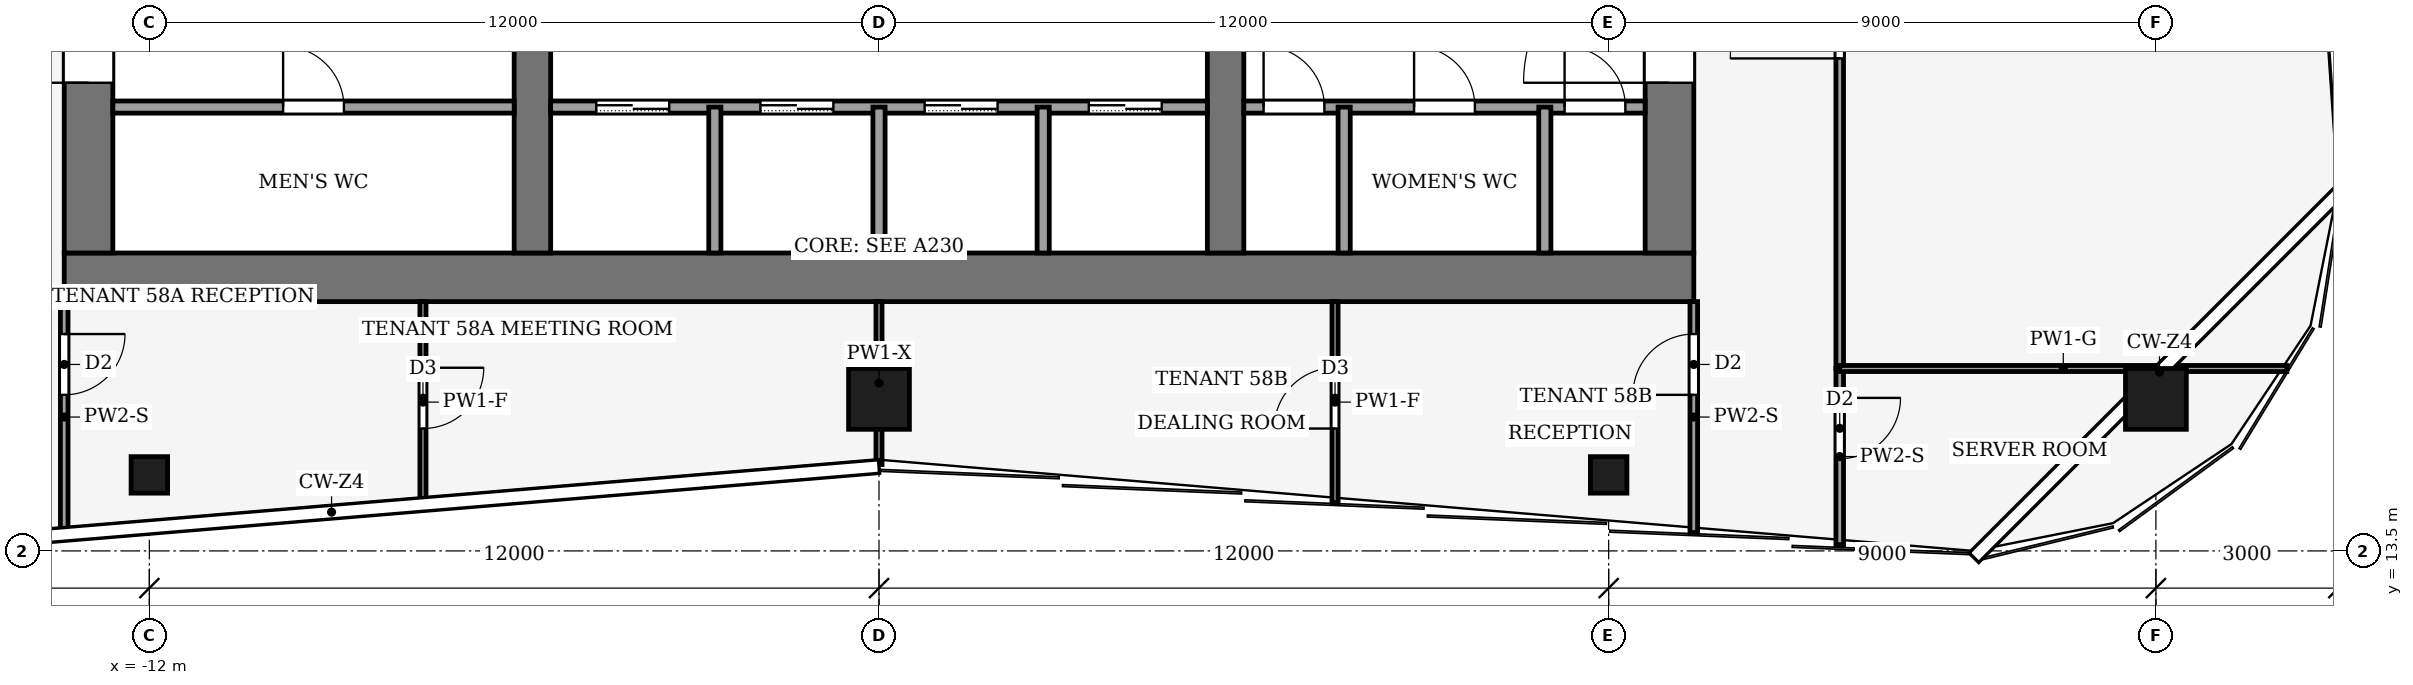
"""IFC4 building model, lengths in metres.
Left out: names, types, materials, properties, quantities, classifications, styles, units other than length and angle.
Written with IfcOpenShell. Run it as: python <this file> out.ifc"""

import sys

from ifc_helpers import new_model, si_unit, direction, frame, frame_2d, origin, origin_2d, place, context, subcontext, project, spatial, rectangle, hollow_rectangle, extrude, element, fill, save


model = new_model("IFC4")
c1 = context("Model", 3, precision=1e-05, world=origin(), true_north=direction((0.0, 1.0)))
c2 = subcontext(c1, "Body", "Model", "MODEL_VIEW")
j1 = project(units=[si_unit("LENGTHUNIT", "METRE"), si_unit("PLANEANGLEUNIT", "RADIAN")], contexts=[c1])
p1 = place(None, origin())
s1 = spatial("IfcSite", under=j1, at=p1, CompositionType="ELEMENT")
p2 = place(p1, origin())
s2 = spatial("IfcBuilding", under=s1, at=p2, CompositionType="ELEMENT")
p3 = place(p2, frame((0.0, 0.0, 254.0)))
s3 = spatial("IfcBuildingStorey", under=s2, at=p3, CompositionType="ELEMENT", Elevation=254.0)
p4 = place(p3, frame((-13.4, 18.0, -0.13), z_axis=(0.0, 0.0, 1.0), x_axis=(1.0, 0.0, 0.0)))
e1 = element("IfcWall", 1, at=p4, inside=s3, PredefinedType="SHEAR", context=c2, shape_type="SweptSolid", body=[
    extrude(rectangle(XDim=26.8, YDim=0.8, at=frame_2d((13.4, 0.0))), origin(), (0.0, 0.0, 1.0), 4.0),
])
p5 = place(p3, frame((-13.0, 18.4, -0.13), z_axis=(0.0, 0.0, 1.0), x_axis=(0.0, 1.0, 0.0)))
e2 = element("IfcWall", 2, at=p5, inside=s3, PredefinedType="SHEAR", context=c2, shape_type="SweptSolid", body=[
    extrude(rectangle(XDim=19.2, YDim=0.8, at=frame_2d((9.6, 0.0))), origin(), (0.0, 0.0, 1.0), 4.0),
])
p6 = place(p5, frame((2.8, 0.0, 0.13)))
e3 = element("IfcOpeningElement", 3, at=p6, cuts=e2, PredefinedType="OPENING", context=c2, shape_type="SweptSolid", body=[
    extrude(rectangle(XDim=2.4, YDim=2.4, at=frame_2d((1.2, 1.2))), frame((0.0, 0.41, 0.0), z_axis=(0.0, -1.0, 0.0), x_axis=(1.0, 0.0, 0.0)), (0.0, 0.0, 1.0), 0.82),
])
p7 = place(p5, frame((13.4, 0.0, 0.13)))
e4 = element("IfcOpeningElement", 4, at=p7, cuts=e2, PredefinedType="OPENING", context=c2, shape_type="SweptSolid", body=[
    extrude(rectangle(XDim=1.4, YDim=2.2, at=frame_2d((0.7, 1.1))), frame((0.0, 0.41, 0.0), z_axis=(0.0, -1.0, 0.0), x_axis=(1.0, 0.0, 0.0)), (0.0, 0.0, 1.0), 0.82),
])
p8 = place(p3, frame((13.0, 18.4, -0.13), z_axis=(0.0, 0.0, 1.0), x_axis=(0.0, 1.0, 0.0)))
e5 = element("IfcWall", 5, at=p8, inside=s3, PredefinedType="SHEAR", context=c2, shape_type="SweptSolid", body=[
    extrude(rectangle(XDim=19.2, YDim=0.8, at=frame_2d((9.6, 0.0))), origin(), (0.0, 0.0, 1.0), 4.0),
])
p9 = place(p8, frame((2.8, 0.0, 0.13)))
e6 = element("IfcOpeningElement", 6, at=p9, cuts=e5, PredefinedType="OPENING", context=c2, shape_type="SweptSolid", body=[
    extrude(rectangle(XDim=2.4, YDim=2.4, at=frame_2d((1.2, 1.2))), frame((0.0, 0.41, 0.0), z_axis=(0.0, -1.0, 0.0), x_axis=(1.0, 0.0, 0.0)), (0.0, 0.0, 1.0), 0.82),
])
p10 = place(p8, frame((13.3, 0.0, 0.13)))
e7 = element("IfcOpeningElement", 7, at=p10, cuts=e5, PredefinedType="OPENING", context=c2, shape_type="SweptSolid", body=[
    extrude(rectangle(XDim=2.4, YDim=2.4, at=frame_2d((1.2, 1.2))), frame((0.0, 0.41, 0.0), z_axis=(0.0, -1.0, 0.0), x_axis=(1.0, 0.0, 0.0)), (0.0, 0.0, 1.0), 0.82),
])
p11 = place(p3, frame((-5.7, 18.4, -0.13), z_axis=(0.0, 0.0, 1.0), x_axis=(0.0, 1.0, 0.0)))
e8 = element("IfcWall", 8, at=p11, inside=s3, PredefinedType="SHEAR", context=c2, shape_type="SweptSolid", body=[
    extrude(rectangle(XDim=19.2, YDim=0.6, at=frame_2d((9.6, 0.0))), origin(), (0.0, 0.0, 1.0), 4.0),
])
p12 = place(p11, frame((8.35, 0.0, 0.13)))
e9 = element("IfcOpeningElement", 9, at=p12, cuts=e8, PredefinedType="OPENING", context=c2, shape_type="SweptSolid", body=[
    extrude(rectangle(XDim=0.9, YDim=2.1, at=frame_2d((0.45, 1.05))), frame((0.0, 0.31, 0.0), z_axis=(0.0, -1.0, 0.0), x_axis=(1.0, 0.0, 0.0)), (0.0, 0.0, 1.0), 0.62),
])
p13 = place(p3, frame((5.7, 18.4, -0.13), z_axis=(0.0, 0.0, 1.0), x_axis=(0.0, 1.0, 0.0)))
e10 = element("IfcWall", 10, at=p13, inside=s3, PredefinedType="SHEAR", context=c2, shape_type="SweptSolid", body=[
    extrude(rectangle(XDim=19.2, YDim=0.6, at=frame_2d((9.6, 0.0))), origin(), (0.0, 0.0, 1.0), 4.0),
])
p14 = place(p13, frame((13.3, 0.0, 0.13)))
e11 = element("IfcOpeningElement", 11, at=p14, cuts=e10, PredefinedType="OPENING", context=c2, shape_type="SweptSolid", body=[
    extrude(rectangle(XDim=2.4, YDim=2.4, at=frame_2d((1.2, 1.2))), frame((0.0, 0.31, 0.0), z_axis=(0.0, -1.0, 0.0), x_axis=(1.0, 0.0, 0.0)), (0.0, 0.0, 1.0), 0.62),
])
for number, where, z_axis, x_axis in (
    (12, (21.0, 16.0, 0.0), (0.0, 0.0, 1.0), (1.0, 0.0, 0.0)),
    (13, (0.0, 16.0, 0.0), (0.0, 0.0, 1.0), (1.0, 0.0, 0.0)),
):
    element("IfcColumn", number, at=place(p3, frame(where, z_axis=z_axis, x_axis=x_axis)), inside=s3, PredefinedType="COLUMN", context=c2, shape_type="SweptSolid", body=[
        extrude(hollow_rectangle(XDim=1.0, YDim=1.0, WallThickness=0.045, at=origin_2d()), origin(), (0.0, 0.0, 1.0), 4.0),
    ])
for number, where, z_axis, x_axis in (
    (14, (-12.0, 14.75, 0.0), (0.0, 0.0, 1.0), (1.0, 0.0, 0.0)),
    (15, (12.0, 14.75, 0.0), (0.0, 0.0, 1.0), (1.0, 0.0, 0.0)),
):
    element("IfcColumn", number, at=place(p3, frame(where, z_axis=z_axis, x_axis=x_axis)), inside=s3, PredefinedType="COLUMN", context=c2, shape_type="SweptSolid", body=[
        extrude(hollow_rectangle(XDim=0.6, YDim=0.6, WallThickness=0.025, at=origin_2d()), origin(), (0.0, 0.0, 1.0), 4.0),
    ])
p15 = place(p3, frame((-12.6, 20.8, 0.0), z_axis=(0.0, 0.0, 1.0), x_axis=(1.0, 0.0, 0.0)))
e16 = element("IfcWall", 16, at=p15, inside=s3, PredefinedType="PARTITIONING", context=c2, shape_type="SweptSolid", body=[
    extrude(rectangle(XDim=6.6, YDim=0.2, at=frame_2d((3.3, 0.0))), origin(), (0.0, 0.0, 1.0), 3.87),
])
p16 = place(p15, frame((2.8, 0.0, 0.0)))
e17 = element("IfcOpeningElement", 17, at=p16, cuts=e16, PredefinedType="OPENING", context=c2, shape_type="SweptSolid", body=[
    extrude(rectangle(XDim=1.0, YDim=2.1, at=frame_2d((0.5, 1.05))), frame((0.0, 0.11, 0.0), z_axis=(0.0, -1.0, 0.0), x_axis=(1.0, 0.0, 0.0)), (0.0, 0.0, 1.0), 0.22),
])
p17 = place(p3, frame((-5.4, 20.8, 0.0), z_axis=(0.0, 0.0, 1.0), x_axis=(1.0, 0.0, 0.0)))
e18 = element("IfcWall", 18, at=p17, inside=s3, PredefinedType="PARTITIONING", context=c2, shape_type="SweptSolid", body=[
    extrude(rectangle(XDim=10.8, YDim=0.2, at=frame_2d((5.4, 0.0))), origin(), (0.0, 0.0, 1.0), 3.87),
])
p18 = place(p17, frame((0.75, 0.0, 0.0)))
e19 = element("IfcOpeningElement", 19, at=p18, cuts=e18, PredefinedType="OPENING", context=c2, shape_type="SweptSolid", body=[
    extrude(rectangle(XDim=1.2, YDim=2.2, at=frame_2d((0.6, 1.1))), frame((0.0, 0.11, 0.0), z_axis=(0.0, -1.0, 0.0), x_axis=(1.0, 0.0, 0.0)), (0.0, 0.0, 1.0), 0.22),
])
p19 = place(p17, frame((3.45, 0.0, 0.0)))
e20 = element("IfcOpeningElement", 20, at=p19, cuts=e18, PredefinedType="OPENING", context=c2, shape_type="SweptSolid", body=[
    extrude(rectangle(XDim=1.2, YDim=2.2, at=frame_2d((0.6, 1.1))), frame((0.0, 0.11, 0.0), z_axis=(0.0, -1.0, 0.0), x_axis=(1.0, 0.0, 0.0)), (0.0, 0.0, 1.0), 0.22),
])
p20 = place(p17, frame((6.15, 0.0, 0.0)))
e21 = element("IfcOpeningElement", 21, at=p20, cuts=e18, PredefinedType="OPENING", context=c2, shape_type="SweptSolid", body=[
    extrude(rectangle(XDim=1.2, YDim=2.2, at=frame_2d((0.6, 1.1))), frame((0.0, 0.11, 0.0), z_axis=(0.0, -1.0, 0.0), x_axis=(1.0, 0.0, 0.0)), (0.0, 0.0, 1.0), 0.22),
])
p21 = place(p17, frame((8.85, 0.0, 0.0)))
e22 = element("IfcOpeningElement", 22, at=p21, cuts=e18, PredefinedType="OPENING", context=c2, shape_type="SweptSolid", body=[
    extrude(rectangle(XDim=1.2, YDim=2.2, at=frame_2d((0.6, 1.1))), frame((0.0, 0.11, 0.0), z_axis=(0.0, -1.0, 0.0), x_axis=(1.0, 0.0, 0.0)), (0.0, 0.0, 1.0), 0.22),
])
p22 = place(p3, frame((6.0, 20.8, 0.0), z_axis=(0.0, 0.0, 1.0), x_axis=(1.0, 0.0, 0.0)))
e23 = element("IfcWall", 23, at=p22, inside=s3, PredefinedType="PARTITIONING", context=c2, shape_type="SweptSolid", body=[
    extrude(rectangle(XDim=6.6, YDim=0.2, at=frame_2d((3.3, 0.0))), origin(), (0.0, 0.0, 1.0), 3.87),
])
p23 = place(p22, frame((0.325, 0.0, 0.0)))
e24 = element("IfcOpeningElement", 24, at=p23, cuts=e23, PredefinedType="OPENING", context=c2, shape_type="SweptSolid", body=[
    extrude(rectangle(XDim=1.0, YDim=2.1, at=frame_2d((0.5, 1.05))), frame((0.0, 0.11, 0.0), z_axis=(0.0, -1.0, 0.0), x_axis=(1.0, 0.0, 0.0)), (0.0, 0.0, 1.0), 0.22),
])
p24 = place(p22, frame((2.8, 0.0, 0.0)))
e25 = element("IfcOpeningElement", 25, at=p24, cuts=e23, PredefinedType="OPENING", context=c2, shape_type="SweptSolid", body=[
    extrude(rectangle(XDim=1.0, YDim=2.1, at=frame_2d((0.5, 1.05))), frame((0.0, 0.11, 0.0), z_axis=(0.0, -1.0, 0.0), x_axis=(1.0, 0.0, 0.0)), (0.0, 0.0, 1.0), 0.22),
])
p25 = place(p22, frame((5.275, 0.0, 0.0)))
e26 = element("IfcOpeningElement", 26, at=p25, cuts=e23, PredefinedType="OPENING", context=c2, shape_type="SweptSolid", body=[
    extrude(rectangle(XDim=1.0, YDim=2.1, at=frame_2d((0.5, 1.05))), frame((0.0, 0.11, 0.0), z_axis=(0.0, -1.0, 0.0), x_axis=(1.0, 0.0, 0.0)), (0.0, 0.0, 1.0), 0.22),
])
for number, where, z_axis, x_axis in (
    (27, (-2.7, 18.4, 0.0), (0.0, 0.0, 1.0), (0.0, 1.0, 0.0)),
    (28, (0.0, 18.4, 0.0), (0.0, 0.0, 1.0), (0.0, 1.0, 0.0)),
    (29, (2.7, 18.4, 0.0), (0.0, 0.0, 1.0), (0.0, 1.0, 0.0)),
    (30, (7.65, 18.4, 0.0), (0.0, 0.0, 1.0), (0.0, 1.0, 0.0)),
    (31, (10.95, 18.4, 0.0), (0.0, 0.0, 1.0), (0.0, 1.0, 0.0)),
):
    element("IfcWall", number, at=place(p3, frame(where, z_axis=z_axis, x_axis=x_axis)), inside=s3, PredefinedType="PARTITIONING", context=c2, shape_type="SweptSolid", body=[
        extrude(rectangle(XDim=2.4, YDim=0.2, at=frame_2d((1.2, 0.0))), origin(), (0.0, 0.0, 1.0), 3.87),
    ])
p26 = place(p3, frame((15.8, 16.5, 0.0), z_axis=(0.0, 0.0, 1.0), x_axis=(0.0, -1.0, 0.0)))
e32 = element("IfcWall", 32, at=p26, inside=s3, PredefinedType="PARTITIONING", context=c2, shape_type="SweptSolid", body=[
    extrude(rectangle(XDim=2.897, YDim=0.125, at=frame_2d((1.448, 0.0))), origin(), (0.0, 0.0, 1.0), 3.04),
])
p27 = place(p26, frame((0.483, 0.0, 0.0)))
e33 = element("IfcOpeningElement", 33, at=p27, cuts=e32, PredefinedType="OPENING", context=c2, shape_type="SweptSolid", body=[
    extrude(rectangle(XDim=1.0, YDim=2.1, at=frame_2d((0.5, 1.05))), frame((0.0, 0.073, 0.0), z_axis=(0.0, -1.0, 0.0), x_axis=(1.0, 0.0, 0.0)), (0.0, 0.0, 1.0), 0.145),
])
p28 = place(p3, frame((15.8, 16.5, 0.0), z_axis=(0.0, 0.0, 1.0), x_axis=(0.0, 1.0, 0.0)))
e34 = element("IfcWall", 34, at=p28, inside=s3, PredefinedType="PARTITIONING", context=c2, shape_type="SweptSolid", body=[
    extrude(rectangle(XDim=12.0, YDim=0.125, at=frame_2d((6.0, 0.0))), origin(), (0.0, 0.0, 1.0), 3.14),
])
p29 = place(p28, frame((5.1, 0.0, 0.0)))
e35 = element("IfcOpeningElement", 35, at=p29, cuts=e34, PredefinedType="OPENING", context=c2, shape_type="SweptSolid", body=[
    extrude(rectangle(XDim=1.8, YDim=2.1, at=frame_2d((0.9, 1.05))), frame((0.0, 0.073, 0.0), z_axis=(0.0, -1.0, 0.0), x_axis=(1.0, 0.0, 0.0)), (0.0, 0.0, 1.0), 0.145),
])
p30 = place(p3, frame((-13.4, 17.6, 0.0), z_axis=(0.0, 0.0, 1.0), x_axis=(0.0, -1.0, 0.0)))
e36 = element("IfcWall", 36, at=p30, inside=s3, PredefinedType="PARTITIONING", context=c2, shape_type="SweptSolid", body=[
    extrude(rectangle(XDim=3.797, YDim=0.125, at=frame_2d((1.898, 0.0))), origin(), (0.0, 0.0, 1.0), 3.04),
])
p31 = place(p30, frame((0.533, 0.0, 0.0)))
e37 = element("IfcOpeningElement", 37, at=p31, cuts=e36, PredefinedType="OPENING", context=c2, shape_type="SweptSolid", body=[
    extrude(rectangle(XDim=1.0, YDim=2.1, at=frame_2d((0.5, 1.05))), frame((0.0, 0.073, 0.0), z_axis=(0.0, -1.0, 0.0), x_axis=(1.0, 0.0, 0.0)), (0.0, 0.0, 1.0), 0.145),
])
p32 = place(p3, frame((13.4, 13.803, 0.0), z_axis=(0.0, 0.0, 1.0), x_axis=(0.0, 1.0, 0.0)))
e38 = element("IfcWall", 38, at=p32, inside=s3, PredefinedType="PARTITIONING", context=c2, shape_type="SweptSolid", body=[
    extrude(rectangle(XDim=3.797, YDim=0.125, at=frame_2d((1.898, 0.0))), origin(), (0.0, 0.0, 1.0), 3.04),
])
p33 = place(p32, frame((2.263, 0.0, 0.0)))
e39 = element("IfcOpeningElement", 39, at=p33, cuts=e38, PredefinedType="OPENING", context=c2, shape_type="SweptSolid", body=[
    extrude(rectangle(XDim=1.0, YDim=2.1, at=frame_2d((0.5, 1.05))), frame((0.0, 0.073, 0.0), z_axis=(0.0, -1.0, 0.0), x_axis=(1.0, 0.0, 0.0)), (0.0, 0.0, 1.0), 0.145),
])
p34 = place(p3, frame((23.153, 16.5, 0.0), z_axis=(0.0, 0.0, 1.0), x_axis=(-1.0, 0.0, 0.0)))
e40 = element("IfcWall", 40, at=p34, inside=s3, PredefinedType="PARTITIONING", context=c2, shape_type="SweptSolid", body=[
    extrude(rectangle(XDim=7.353, YDim=0.1, at=frame_2d((3.676, 0.0))), origin(), (0.0, 0.0, 1.0), 2.93),
])
p35 = place(p3, frame((-7.5, 17.6, 0.0), z_axis=(0.0, 0.0, 1.0), x_axis=(0.0, -1.0, 0.0)))
e41 = element("IfcWall", 41, at=p35, inside=s3, PredefinedType="PARTITIONING", context=c2, shape_type="SweptSolid", body=[
    extrude(rectangle(XDim=3.305, YDim=0.1, at=frame_2d((1.653, 0.0))), origin(), (0.0, 0.0, 1.0), 3.04),
])
p36 = place(p35, frame((1.087, 0.0, 0.0)))
e42 = element("IfcOpeningElement", 42, at=p36, cuts=e41, PredefinedType="OPENING", context=c2, shape_type="SweptSolid", body=[
    extrude(rectangle(XDim=1.0, YDim=2.1, at=frame_2d((0.5, 1.05))), frame((0.0, 0.06, 0.0), z_axis=(0.0, -1.0, 0.0), x_axis=(1.0, 0.0, 0.0)), (0.0, 0.0, 1.0), 0.12),
])
p37 = place(p3, frame((0.0, 14.92, 0.0), z_axis=(0.0, 0.0, 1.0), x_axis=(0.0, 1.0, 0.0)))
e43 = element("IfcWall", 43, at=p37, inside=s3, PredefinedType="PARTITIONING", context=c2, shape_type="SweptSolid", body=[
    extrude(rectangle(XDim=2.68, YDim=0.1, at=frame_2d((1.34, 0.0))), origin(), (0.0, 0.0, 1.0), 3.54),
])
p38 = place(p3, frame((7.5, 14.295, 0.0), z_axis=(0.0, 0.0, 1.0), x_axis=(0.0, 1.0, 0.0)))
e44 = element("IfcWall", 44, at=p38, inside=s3, PredefinedType="PARTITIONING", context=c2, shape_type="SweptSolid", body=[
    extrude(rectangle(XDim=3.305, YDim=0.1, at=frame_2d((1.653, 0.0))), origin(), (0.0, 0.0, 1.0), 3.04),
])
p39 = place(p38, frame((1.218, 0.0, 0.0)))
e45 = element("IfcOpeningElement", 45, at=p39, cuts=e44, PredefinedType="OPENING", context=c2, shape_type="SweptSolid", body=[
    extrude(rectangle(XDim=1.0, YDim=2.1, at=frame_2d((0.5, 1.05))), frame((0.0, 0.06, 0.0), z_axis=(0.0, -1.0, 0.0), x_axis=(1.0, 0.0, 0.0)), (0.0, 0.0, 1.0), 0.12),
])
p40 = place(p18, origin())
e46 = element("IfcDoor", 46, at=p40, inside=s3, OperationType="SLIDING_TO_LEFT", PredefinedType="DOOR", context=c2, shape_type="SweptSolid", body=[
    extrude(rectangle(XDim=1.2, YDim=2.2, at=frame_2d((0.6, 1.1))), frame((0.0, 0.025, 0.0), z_axis=(0.0, -1.0, 0.0), x_axis=(1.0, 0.0, 0.0)), (0.0, 0.0, 1.0), 0.05),
])
fill(e19, e46)
p41 = place(p19, origin())
e47 = element("IfcDoor", 47, at=p41, inside=s3, OperationType="SLIDING_TO_LEFT", PredefinedType="DOOR", context=c2, shape_type="SweptSolid", body=[
    extrude(rectangle(XDim=1.2, YDim=2.2, at=frame_2d((0.6, 1.1))), frame((0.0, 0.025, 0.0), z_axis=(0.0, -1.0, 0.0), x_axis=(1.0, 0.0, 0.0)), (0.0, 0.0, 1.0), 0.05),
])
fill(e20, e47)
p42 = place(p20, origin())
e48 = element("IfcDoor", 48, at=p42, inside=s3, OperationType="SLIDING_TO_LEFT", PredefinedType="DOOR", context=c2, shape_type="SweptSolid", body=[
    extrude(rectangle(XDim=1.2, YDim=2.2, at=frame_2d((0.6, 1.1))), frame((0.0, 0.025, 0.0), z_axis=(0.0, -1.0, 0.0), x_axis=(1.0, 0.0, 0.0)), (0.0, 0.0, 1.0), 0.05),
])
fill(e21, e48)
p43 = place(p21, origin())
e49 = element("IfcDoor", 49, at=p43, inside=s3, OperationType="SLIDING_TO_LEFT", PredefinedType="DOOR", context=c2, shape_type="SweptSolid", body=[
    extrude(rectangle(XDim=1.2, YDim=2.2, at=frame_2d((0.6, 1.1))), frame((0.0, 0.025, 0.0), z_axis=(0.0, -1.0, 0.0), x_axis=(1.0, 0.0, 0.0)), (0.0, 0.0, 1.0), 0.05),
])
fill(e22, e49)
p44 = place(p16, origin())
e50 = element("IfcDoor", 50, at=p44, inside=s3, OperationType="SINGLE_SWING_LEFT", PredefinedType="DOOR", context=c2, shape_type="SweptSolid", body=[
    extrude(rectangle(XDim=1.0, YDim=2.1, at=frame_2d((0.5, 1.05))), frame((0.0, 0.025, 0.0), z_axis=(0.0, -1.0, 0.0), x_axis=(1.0, 0.0, 0.0)), (0.0, 0.0, 1.0), 0.05),
])
fill(e17, e50)
p45 = place(p23, origin())
e51 = element("IfcDoor", 51, at=p45, inside=s3, OperationType="SINGLE_SWING_LEFT", PredefinedType="DOOR", context=c2, shape_type="SweptSolid", body=[
    extrude(rectangle(XDim=1.0, YDim=2.1, at=frame_2d((0.5, 1.05))), frame((0.0, 0.025, 0.0), z_axis=(0.0, -1.0, 0.0), x_axis=(1.0, 0.0, 0.0)), (0.0, 0.0, 1.0), 0.05),
])
fill(e24, e51)
p46 = place(p24, origin())
e52 = element("IfcDoor", 52, at=p46, inside=s3, OperationType="SINGLE_SWING_LEFT", PredefinedType="DOOR", context=c2, shape_type="SweptSolid", body=[
    extrude(rectangle(XDim=1.0, YDim=2.1, at=frame_2d((0.5, 1.05))), frame((0.0, 0.025, 0.0), z_axis=(0.0, -1.0, 0.0), x_axis=(1.0, 0.0, 0.0)), (0.0, 0.0, 1.0), 0.05),
])
fill(e25, e52)
p47 = place(p25, origin())
e53 = element("IfcDoor", 53, at=p47, inside=s3, OperationType="SINGLE_SWING_LEFT", PredefinedType="DOOR", context=c2, shape_type="SweptSolid", body=[
    extrude(rectangle(XDim=1.0, YDim=2.1, at=frame_2d((0.5, 1.05))), frame((0.0, 0.025, 0.0), z_axis=(0.0, -1.0, 0.0), x_axis=(1.0, 0.0, 0.0)), (0.0, 0.0, 1.0), 0.05),
])
fill(e26, e53)
p48 = place(p6, origin())
e54 = element("IfcDoor", 54, at=p48, inside=s3, OperationType="DOUBLE_DOOR_SINGLE_SWING", PredefinedType="DOOR", context=c2, shape_type="SweptSolid", body=[
    extrude(rectangle(XDim=2.4, YDim=2.4, at=frame_2d((1.2, 1.2))), frame((0.0, 0.025, 0.0), z_axis=(0.0, -1.0, 0.0), x_axis=(1.0, 0.0, 0.0)), (0.0, 0.0, 1.0), 0.05),
])
fill(e3, e54)
p49 = place(p9, origin())
e55 = element("IfcDoor", 55, at=p49, inside=s3, OperationType="DOUBLE_DOOR_SINGLE_SWING", PredefinedType="DOOR", context=c2, shape_type="SweptSolid", body=[
    extrude(rectangle(XDim=2.4, YDim=2.4, at=frame_2d((1.2, 1.2))), frame((0.0, 0.025, 0.0), z_axis=(0.0, -1.0, 0.0), x_axis=(1.0, 0.0, 0.0)), (0.0, 0.0, 1.0), 0.05),
])
fill(e6, e55)
p50 = place(p27, origin())
e56 = element("IfcDoor", 56, at=p50, inside=s3, OperationType="SINGLE_SWING_LEFT", PredefinedType="DOOR", context=c2, shape_type="SweptSolid", body=[
    extrude(rectangle(XDim=1.0, YDim=2.1, at=frame_2d((0.5, 1.05))), frame((0.0, 0.025, 0.0), z_axis=(0.0, -1.0, 0.0), x_axis=(1.0, 0.0, 0.0)), (0.0, 0.0, 1.0), 0.05),
])
fill(e33, e56)
p51 = place(p29, origin())
e57 = element("IfcDoor", 57, at=p51, inside=s3, OperationType="DOUBLE_DOOR_SINGLE_SWING", PredefinedType="DOOR", context=c2, shape_type="SweptSolid", body=[
    extrude(rectangle(XDim=1.8, YDim=2.1, at=frame_2d((0.9, 1.05))), frame((0.0, 0.025, 0.0), z_axis=(0.0, -1.0, 0.0), x_axis=(1.0, 0.0, 0.0)), (0.0, 0.0, 1.0), 0.05),
])
fill(e35, e57)
p52 = place(p31, origin())
e58 = element("IfcDoor", 58, at=p52, inside=s3, OperationType="SINGLE_SWING_LEFT", PredefinedType="DOOR", context=c2, shape_type="SweptSolid", body=[
    extrude(rectangle(XDim=1.0, YDim=2.1, at=frame_2d((0.5, 1.05))), frame((0.0, 0.025, 0.0), z_axis=(0.0, -1.0, 0.0), x_axis=(1.0, 0.0, 0.0)), (0.0, 0.0, 1.0), 0.05),
])
fill(e37, e58)
p53 = place(p33, origin())
e59 = element("IfcDoor", 59, at=p53, inside=s3, OperationType="SINGLE_SWING_RIGHT", PredefinedType="DOOR", context=c2, shape_type="SweptSolid", body=[
    extrude(rectangle(XDim=1.0, YDim=2.1, at=frame_2d((0.5, 1.05))), frame((0.0, 0.025, 0.0), z_axis=(0.0, -1.0, 0.0), x_axis=(1.0, 0.0, 0.0)), (0.0, 0.0, 1.0), 0.05),
])
fill(e39, e59)
p54 = place(p36, origin())
e60 = element("IfcDoor", 60, at=p54, inside=s3, OperationType="SINGLE_SWING_LEFT", PredefinedType="DOOR", context=c2, shape_type="SweptSolid", body=[
    extrude(rectangle(XDim=1.0, YDim=2.1, at=frame_2d((0.5, 1.05))), frame((0.0, 0.025, 0.0), z_axis=(0.0, -1.0, 0.0), x_axis=(1.0, 0.0, 0.0)), (0.0, 0.0, 1.0), 0.05),
])
fill(e42, e60)
p55 = place(p39, origin())
e61 = element("IfcDoor", 61, at=p55, inside=s3, OperationType="SINGLE_SWING_RIGHT", PredefinedType="DOOR", context=c2, shape_type="SweptSolid", body=[
    extrude(rectangle(XDim=1.0, YDim=2.1, at=frame_2d((0.5, 1.05))), frame((0.0, 0.025, 0.0), z_axis=(0.0, -1.0, 0.0), x_axis=(1.0, 0.0, 0.0)), (0.0, 0.0, 1.0), 0.05),
])
fill(e45, e61)
save(model, sys.argv[1])
